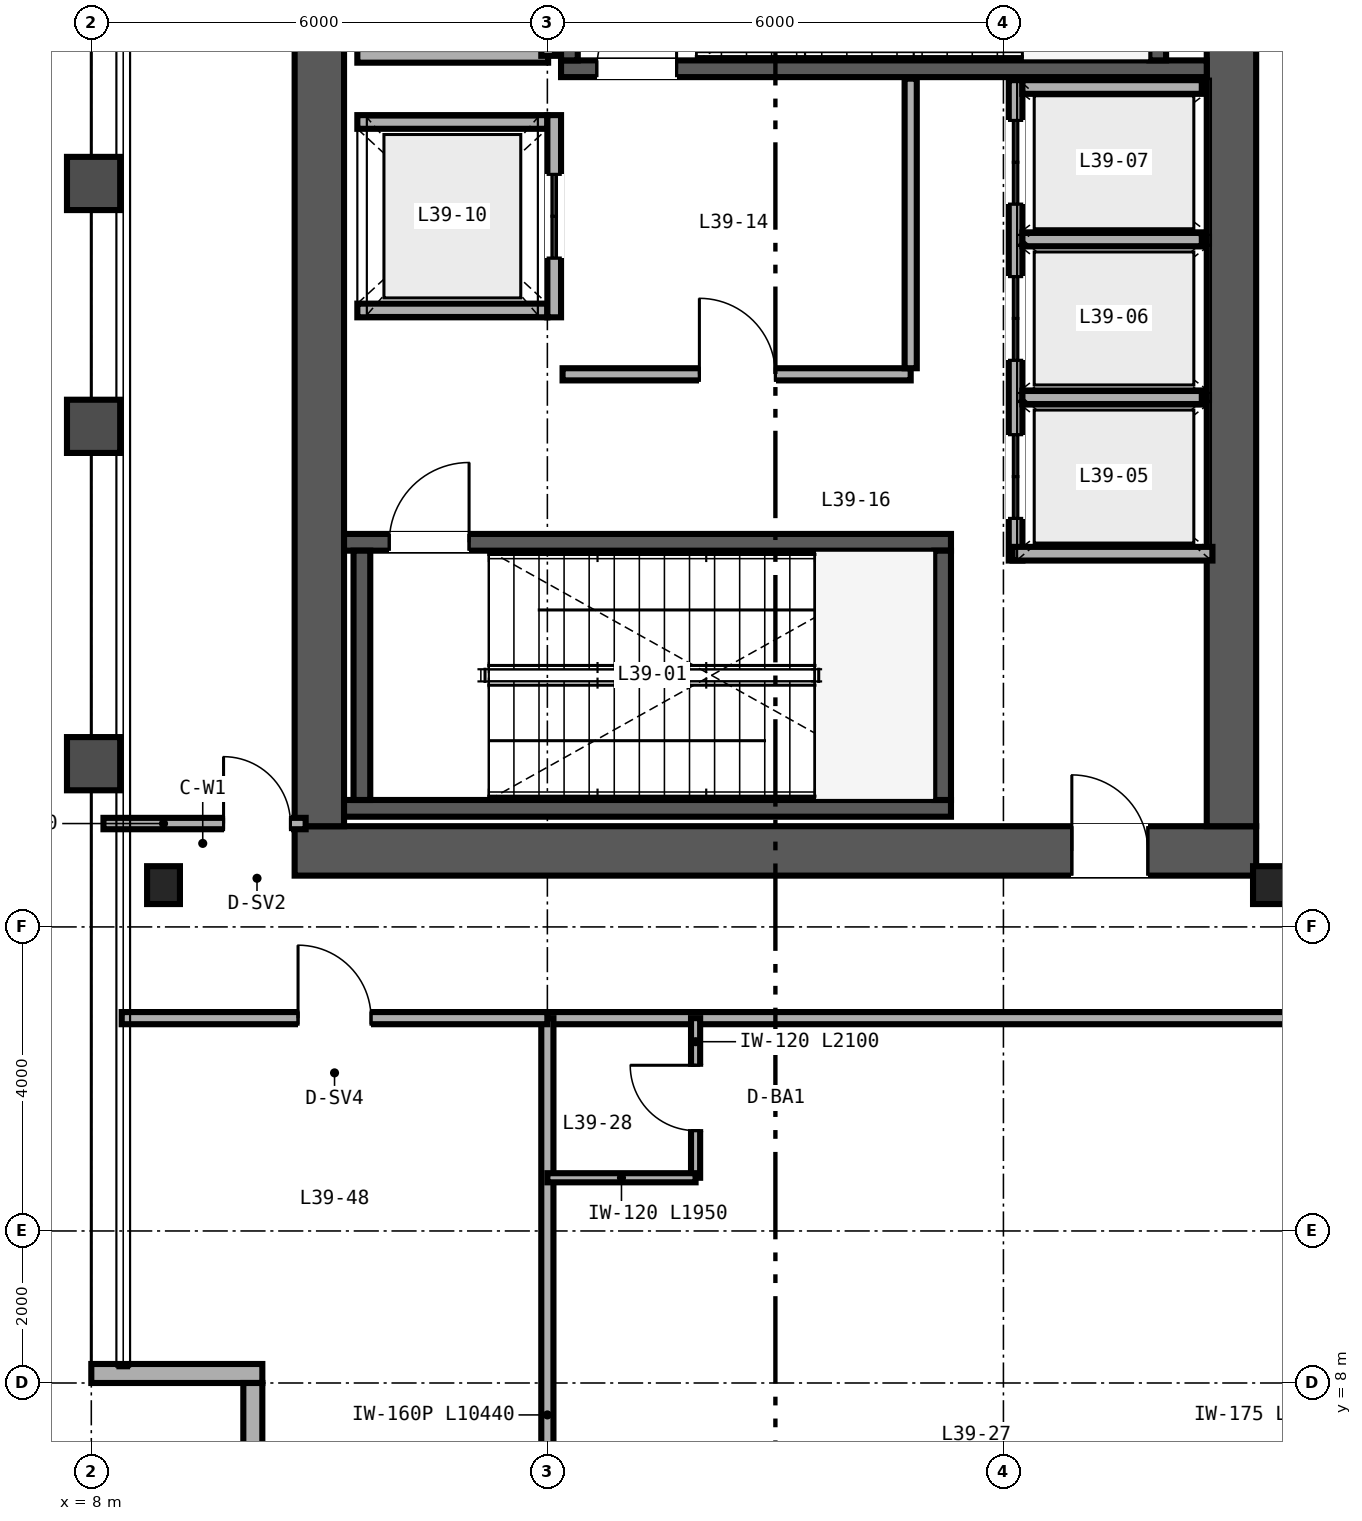
"""IFC4 building model, lengths in metres.
Left out: names, types, materials, properties, quantities, classifications, styles, units other than length and angle.
Written with IfcOpenShell. Run it as: python <this file> out.ifc"""

import sys

from ifc_helpers import new_model, si_unit, direction, frame, frame_2d, origin, origin_2d, place, context, subcontext, project, spatial, rectangle, i_section, extrude, source, transform, mapped, element, fill, save


model = new_model("IFC4")
c1 = context("Model", 3, precision=1e-05, world=origin(), true_north=direction((0.0, 1.0)))
c2 = subcontext(c1, "Body", "Model", "MODEL_VIEW")
j1 = project(units=[si_unit("LENGTHUNIT", "METRE"), si_unit("PLANEANGLEUNIT", "RADIAN")], contexts=[c1])
p1 = place(None, origin())
s1 = spatial("IfcSite", under=j1, at=p1, CompositionType="ELEMENT")
p2 = place(p1, origin())
s2 = spatial("IfcBuilding", under=s1, at=p2, CompositionType="ELEMENT")
p3 = place(p2, frame((0.0, 0.0, 158.4)))
s3 = spatial("IfcBuildingStorey", under=s2, at=p3, CompositionType="ELEMENT", Elevation=158.4)
p4 = place(p3, frame((10.675, 15.0, 0.0), z_axis=(0.0, 0.0, 1.0), x_axis=(1.0, 0.0, 0.0)))
e1 = element("IfcWall", 1, at=p4, inside=s3, PredefinedType="SHEAR", context=c2, shape_type="SweptSolid", body=[
    extrude(rectangle(XDim=12.65, YDim=0.65, at=frame_2d((6.325, 0.0))), origin(), (0.0, 0.0, 1.0), 4.57),
])
p5 = place(p4, frame((10.225, 0.0, 0.0)))
e2 = element("IfcOpeningElement", 2, at=p5, cuts=e1, PredefinedType="OPENING", context=c2, shape_type="SweptSolid", body=[
    extrude(rectangle(XDim=1.0, YDim=2.15, at=frame_2d((0.5, 1.075))), frame((0.0, 0.335, 0.0), z_axis=(0.0, -1.0, 0.0), x_axis=(1.0, 0.0, 0.0)), (0.0, 0.0, 1.0), 0.67),
])
for number, where, z_axis, x_axis in (
    (3, (11.0, 15.325, 0.0), (0.0, 0.0, 1.0), (0.0, 1.0, 0.0)),
    (4, (23.0, 15.325, 0.0), (0.0, 0.0, 1.0), (0.0, 1.0, 0.0)),
):
    element("IfcWall", number, at=place(p3, frame(where, z_axis=z_axis, x_axis=x_axis)), inside=s3, PredefinedType="SHEAR", context=c2, shape_type="SweptSolid", body=[
        extrude(rectangle(XDim=21.35, YDim=0.65, at=frame_2d((10.675, 0.0))), origin(), (0.0, 0.0, 1.0), 4.57),
    ])
p6 = place(p3, frame((11.325, 15.56, 0.0), z_axis=(0.0, 0.0, 1.0), x_axis=(1.0, 0.0, 0.0)))
e5 = element("IfcWall", 5, at=p6, inside=s3, PredefinedType="SHEAR", context=c2, shape_type="SweptSolid", body=[
    extrude(rectangle(XDim=7.985, YDim=0.22, at=frame_2d((3.993, 0.0))), origin(), (0.0, 0.0, 1.0), 4.6),
])
p7 = place(p3, frame((11.325, 19.06, 0.0), z_axis=(0.0, 0.0, 1.0), x_axis=(1.0, 0.0, 0.0)))
e6 = element("IfcWall", 6, at=p7, inside=s3, PredefinedType="SHEAR", context=c2, shape_type="SweptSolid", body=[
    extrude(rectangle(XDim=7.985, YDim=0.22, at=frame_2d((3.993, 0.0))), origin(), (0.0, 0.0, 1.0), 4.6),
])
p8 = place(p7, frame((0.595, 0.0, 0.0)))
e7 = element("IfcOpeningElement", 7, at=p8, cuts=e6, PredefinedType="OPENING", context=c2, shape_type="SweptSolid", body=[
    extrude(rectangle(XDim=1.05, YDim=2.15, at=frame_2d((0.525, 1.075))), frame((0.0, 0.12, 0.0), z_axis=(0.0, -1.0, 0.0), x_axis=(1.0, 0.0, 0.0)), (0.0, 0.0, 1.0), 0.24),
])
for number, where, z_axis, x_axis in (
    (8, (11.56, 15.67, 0.0), (0.0, 0.0, 1.0), (0.0, 1.0, 0.0)),
    (9, (19.2, 15.67, 0.0), (0.0, 0.0, 1.0), (0.0, 1.0, 0.0)),
):
    element("IfcWall", number, at=place(p3, frame(where, z_axis=z_axis, x_axis=x_axis)), inside=s3, PredefinedType="SHEAR", context=c2, shape_type="SweptSolid", body=[
        extrude(rectangle(XDim=3.28, YDim=0.22, at=frame_2d((1.64, 0.0))), origin(), (0.0, 0.0, 1.0), 4.6),
    ])
p9 = place(p3, frame((14.18, 25.29, 0.0), z_axis=(0.0, 0.0, 1.0), x_axis=(1.0, 0.0, 0.0)))
e10 = element("IfcWall", 10, at=p9, inside=s3, PredefinedType="SHEAR", context=c2, shape_type="SweptSolid", body=[
    extrude(rectangle(XDim=8.495, YDim=0.22, at=frame_2d((4.248, 0.0))), origin(), (0.0, 0.0, 1.0), 4.6),
])
p10 = place(p9, frame((0.47, 0.0, 0.0)))
e11 = element("IfcOpeningElement", 11, at=p10, cuts=e10, PredefinedType="OPENING", context=c2, shape_type="SweptSolid", body=[
    extrude(rectangle(XDim=1.05, YDim=2.15, at=frame_2d((0.525, 1.075))), frame((0.0, 0.12, 0.0), z_axis=(0.0, -1.0, 0.0), x_axis=(1.0, 0.0, 0.0)), (0.0, 0.0, 1.0), 0.24),
])
for number, where, z_axis, x_axis in (
    (12, (14.29, 25.4, 0.0), (0.0, 0.0, 1.0), (0.0, 1.0, 0.0)),
    (13, (22.03, 25.4, 0.0), (0.0, 0.0, 1.0), (0.0, 1.0, 0.0)),
):
    element("IfcWall", number, at=place(p3, frame(where, z_axis=z_axis, x_axis=x_axis)), inside=s3, PredefinedType="SHEAR", context=c2, shape_type="SweptSolid", body=[
        extrude(rectangle(XDim=3.28, YDim=0.22, at=frame_2d((1.64, 0.0))), origin(), (0.0, 0.0, 1.0), 4.6),
    ])
m1 = source(origin(), c2, "Body", "SweptSolid", [
    extrude(i_section(OverallWidth=0.432, OverallDepth=0.498, WebThickness=0.056, FlangeThickness=0.089, FilletRadius=0.025, at=origin_2d()), origin(), (0.0, 0.0, 1.0), 4.57),
])
for number, where, z_axis, x_axis in (
    (14, (8.95, 14.55, 0.0), (0.0, 0.0, 1.0), (1.0, 0.0, 0.0)),
    (15, (23.5, 14.55, 0.0), (0.0, 0.0, 1.0), (1.0, 0.0, 0.0)),
):
    element("IfcColumn", number, at=place(p3, frame(where, z_axis=z_axis, x_axis=x_axis)), inside=s3, PredefinedType="COLUMN", context=c2, shape_type="MappedRepresentation", body=[
        mapped(m1, transform((0.0, 0.0, 0.0), scale=1.0)),
    ])
p11 = place(p3, frame((8.0, 8.125, 0.0), z_axis=(0.0, 0.0, 1.0), x_axis=(1.0, 0.0, 0.0)))
e16 = element("IfcWall", 16, at=p11, inside=s3, PredefinedType="SOLIDWALL", context=c2, shape_type="SweptSolid", body=[
    extrude(rectangle(XDim=2.25, YDim=0.25, at=frame_2d((1.125, 0.0))), origin(), (0.0, 0.0, 1.0), 4.57),
])
p12 = place(p3, frame((10.125, 8.0, 0.0), z_axis=(0.0, 0.0, 1.0), x_axis=(0.0, -1.0, 0.0)))
e17 = element("IfcWall", 17, at=p12, inside=s3, PredefinedType="SOLIDWALL", context=c2, shape_type="SweptSolid", body=[
    extrude(rectangle(XDim=2.0, YDim=0.25, at=frame_2d((1.0, 0.0))), origin(), (0.0, 0.0, 1.0), 4.57),
])
p13 = place(p3, frame((20.16, 18.82, 0.0), z_axis=(0.0, 0.0, 1.0), x_axis=(0.0, 1.0, 0.0)))
e18 = element("IfcWall", 18, at=p13, inside=s3, PredefinedType="SOLIDWALL", context=c2, shape_type="SweptSolid", body=[
    extrude(rectangle(XDim=6.32, YDim=0.18, at=frame_2d((3.16, 0.0))), origin(), (0.0, 0.0, 1.0), 3.47),
])
p14 = place(p13, frame((0.555, 0.0, 0.0)))
e19 = element("IfcOpeningElement", 19, at=p14, cuts=e18, PredefinedType="OPENING", context=c2, shape_type="SweptSolid", body=[
    extrude(rectangle(XDim=1.1, YDim=2.2, at=frame_2d((0.55, 1.1))), frame((0.0, 0.1, 0.0), z_axis=(0.0, -1.0, 0.0), x_axis=(1.0, 0.0, 0.0)), (0.0, 0.0, 1.0), 0.2),
])
p15 = place(p13, frame((2.635, 0.0, 0.0)))
e20 = element("IfcOpeningElement", 20, at=p15, cuts=e18, PredefinedType="OPENING", context=c2, shape_type="SweptSolid", body=[
    extrude(rectangle(XDim=1.1, YDim=2.2, at=frame_2d((0.55, 1.1))), frame((0.0, 0.1, 0.0), z_axis=(0.0, -1.0, 0.0), x_axis=(1.0, 0.0, 0.0)), (0.0, 0.0, 1.0), 0.2),
])
p16 = place(p13, frame((4.69, 0.0, 0.0)))
e21 = element("IfcOpeningElement", 21, at=p16, cuts=e18, PredefinedType="OPENING", context=c2, shape_type="SweptSolid", body=[
    extrude(rectangle(XDim=1.1, YDim=2.2, at=frame_2d((0.55, 1.1))), frame((0.0, 0.1, 0.0), z_axis=(0.0, -1.0, 0.0), x_axis=(1.0, 0.0, 0.0)), (0.0, 0.0, 1.0), 0.2),
])
p17 = place(p3, frame((20.12, 18.91, 0.0), z_axis=(0.0, 0.0, 1.0), x_axis=(1.0, 0.0, 0.0)))
e22 = element("IfcWall", 22, at=p17, inside=s3, PredefinedType="SOLIDWALL", context=c2, shape_type="SweptSolid", body=[
    extrude(rectangle(XDim=2.63, YDim=0.18, at=frame_2d((1.315, 0.0))), origin(), (0.0, 0.0, 1.0), 4.57),
])
p18 = place(p3, frame((20.25, 25.05, 0.0), z_axis=(0.0, 0.0, 1.0), x_axis=(1.0, 0.0, 0.0)))
e23 = element("IfcWall", 23, at=p18, inside=s3, PredefinedType="SOLIDWALL", context=c2, shape_type="SweptSolid", body=[
    extrude(rectangle(XDim=2.36, YDim=0.18, at=frame_2d((1.18, 0.0))), origin(), (0.0, 0.0, 1.0), 4.57),
])
p19 = place(p3, frame((20.25, 20.965, 0.0), z_axis=(0.0, 0.0, 1.0), x_axis=(1.0, 0.0, 0.0)))
e24 = element("IfcWall", 24, at=p19, inside=s3, PredefinedType="SOLIDWALL", context=c2, shape_type="SweptSolid", body=[
    extrude(rectangle(XDim=2.36, YDim=0.18, at=frame_2d((1.18, 0.0))), origin(), (0.0, 0.0, 1.0), 3.47),
])
p20 = place(p3, frame((20.25, 23.045, 0.0), z_axis=(0.0, 0.0, 1.0), x_axis=(1.0, 0.0, 0.0)))
e25 = element("IfcWall", 25, at=p20, inside=s3, PredefinedType="SOLIDWALL", context=c2, shape_type="SweptSolid", body=[
    extrude(rectangle(XDim=2.36, YDim=0.18, at=frame_2d((1.18, 0.0))), origin(), (0.0, 0.0, 1.0), 4.57),
])
for number, where, z_axis, x_axis in (
    (26, (11.5, 22.11, 0.0), (0.0, 0.0, 1.0), (1.0, 0.0, 0.0)),
    (27, (11.5, 24.59, 0.0), (0.0, 0.0, 1.0), (1.0, 0.0, 0.0)),
):
    element("IfcWall", number, at=place(p3, frame(where, z_axis=z_axis, x_axis=x_axis)), inside=s3, PredefinedType="SOLIDWALL", context=c2, shape_type="SweptSolid", body=[
        extrude(rectangle(XDim=2.5, YDim=0.18, at=frame_2d((1.25, 0.0))), origin(), (0.0, 0.0, 1.0), 4.57),
    ])
p21 = place(p3, frame((14.09, 22.02, 0.0), z_axis=(0.0, 0.0, 1.0), x_axis=(0.0, 1.0, 0.0)))
e28 = element("IfcWall", 28, at=p21, inside=s3, PredefinedType="SOLIDWALL", context=c2, shape_type="SweptSolid", body=[
    extrude(rectangle(XDim=2.66, YDim=0.18, at=frame_2d((1.33, 0.0))), origin(), (0.0, 0.0, 1.0), 4.57),
])
p22 = place(p21, frame((0.78, 0.0, 0.0)))
e29 = element("IfcOpeningElement", 29, at=p22, cuts=e28, PredefinedType="OPENING", context=c2, shape_type="SweptSolid", body=[
    extrude(rectangle(XDim=1.1, YDim=2.2, at=frame_2d((0.55, 1.1))), frame((0.0, 0.1, 0.0), z_axis=(0.0, -1.0, 0.0), x_axis=(1.0, 0.0, 0.0)), (0.0, 0.0, 1.0), 0.2),
])
p23 = place(p3, frame((11.5, 25.46, 0.0), z_axis=(0.0, 0.0, 1.0), x_axis=(1.0, 0.0, 0.0)))
e30 = element("IfcWall", 30, at=p23, inside=s3, PredefinedType="SOLIDWALL", context=c2, shape_type="SweptSolid", body=[
    extrude(rectangle(XDim=2.51, YDim=0.18, at=frame_2d((1.255, 0.0))), origin(), (0.0, 0.0, 1.0), 4.57),
])
p24 = place(p3, frame((14.01, 25.46, 0.0), z_axis=(0.0, 0.0, 1.0), x_axis=(0.0, 1.0, 0.0)))
e31 = element("IfcWall", 31, at=p24, inside=s3, PredefinedType="SOLIDWALL", context=c2, shape_type="SweptSolid", body=[
    extrude(rectangle(XDim=3.08, YDim=0.18, at=frame_2d((1.54, 0.0))), origin(), (0.0, 0.0, 1.0), 4.57),
])
p25 = place(p3, frame((14.2, 21.27, 0.0), z_axis=(0.0, 0.0, 1.0), x_axis=(1.0, 0.0, 0.0)))
e32 = element("IfcWall", 32, at=p25, inside=s3, PredefinedType="PARTITIONING", context=c2, shape_type="SweptSolid", body=[
    extrude(rectangle(XDim=4.58, YDim=0.16, at=frame_2d((2.29, 0.0))), origin(), (0.0, 0.0, 1.0), 4.57),
])
p26 = place(p25, frame((1.8, 0.0, 0.0)))
e33 = element("IfcOpeningElement", 33, at=p26, cuts=e32, PredefinedType="OPENING", context=c2, shape_type="SweptSolid", body=[
    extrude(rectangle(XDim=1.0, YDim=2.15, at=frame_2d((0.5, 1.075))), frame((0.0, 0.09, 0.0), z_axis=(0.0, -1.0, 0.0), x_axis=(1.0, 0.0, 0.0)), (0.0, 0.0, 1.0), 0.18),
])
p27 = place(p3, frame((18.78, 21.35, 0.0), z_axis=(0.0, 0.0, 1.0), x_axis=(0.0, 1.0, 0.0)))
e34 = element("IfcWall", 34, at=p27, inside=s3, PredefinedType="PARTITIONING", context=c2, shape_type="SweptSolid", body=[
    extrude(rectangle(XDim=3.81, YDim=0.16, at=frame_2d((1.905, 0.0))), origin(), (0.0, 0.0, 1.0), 4.57),
])
p28 = place(p3, frame((14.0, 12.8, 0.0), z_axis=(0.0, 0.0, 1.0), x_axis=(1.0, 0.0, 0.0)))
e35 = element("IfcWall", 35, at=p28, inside=s3, PredefinedType="PARTITIONING", context=c2, shape_type="SweptSolid", body=[
    extrude(rectangle(XDim=36.0, YDim=0.16, at=frame_2d((18.0, 0.0))), origin(), (0.0, 0.0, 1.0), 4.113),
])
p29 = place(p28, frame((9.7, 0.0, 0.0)))
e36 = element("IfcOpeningElement", 36, at=p29, cuts=e35, PredefinedType="OPENING", context=c2, shape_type="SweptSolid", body=[
    extrude(rectangle(XDim=0.98, YDim=2.2, at=frame_2d((0.49, 1.1))), frame((0.0, 0.09, 0.0), z_axis=(0.0, -1.0, 0.0), x_axis=(1.0, 0.0, 0.0)), (0.0, 0.0, 1.0), 0.18),
])
p30 = place(p28, frame((16.02, 0.0, 0.0)))
e37 = element("IfcOpeningElement", 37, at=p30, cuts=e35, PredefinedType="OPENING", context=c2, shape_type="SweptSolid", body=[
    extrude(rectangle(XDim=0.96, YDim=2.15, at=frame_2d((0.48, 1.075))), frame((0.0, 0.09, 0.0), z_axis=(0.0, -1.0, 0.0), x_axis=(1.0, 0.0, 0.0)), (0.0, 0.0, 1.0), 0.18),
])
p31 = place(p28, frame((28.7, 0.0, 0.0)))
e38 = element("IfcOpeningElement", 38, at=p31, cuts=e35, PredefinedType="OPENING", context=c2, shape_type="SweptSolid", body=[
    extrude(rectangle(XDim=0.98, YDim=2.2, at=frame_2d((0.49, 1.1))), frame((0.0, 0.09, 0.0), z_axis=(0.0, -1.0, 0.0), x_axis=(1.0, 0.0, 0.0)), (0.0, 0.0, 1.0), 0.18),
])
p32 = place(p28, frame((32.52, 0.0, 0.0)))
e39 = element("IfcOpeningElement", 39, at=p32, cuts=e35, PredefinedType="OPENING", context=c2, shape_type="SweptSolid", body=[
    extrude(rectangle(XDim=0.96, YDim=2.15, at=frame_2d((0.48, 1.075))), frame((0.0, 0.09, 0.0), z_axis=(0.0, -1.0, 0.0), x_axis=(1.0, 0.0, 0.0)), (0.0, 0.0, 1.0), 0.18),
])
p33 = place(p3, frame((14.0, 2.36, 0.0), z_axis=(0.0, 0.0, 1.0), x_axis=(0.0, 1.0, 0.0)))
e40 = element("IfcWall", 40, at=p33, inside=s3, PredefinedType="PARTITIONING", context=c2, shape_type="SweptSolid", body=[
    extrude(rectangle(XDim=10.44, YDim=0.16, at=frame_2d((5.22, 0.0))), origin(), (0.0, 0.0, 1.0), 3.877),
])
p34 = place(p3, frame((15.95, 10.7, 0.0), z_axis=(0.0, 0.0, 1.0), x_axis=(0.0, 1.0, 0.0)))
e41 = element("IfcWall", 41, at=p34, inside=s3, PredefinedType="PARTITIONING", context=c2, shape_type="SweptSolid", body=[
    extrude(rectangle(XDim=2.1, YDim=0.12, at=frame_2d((1.05, 0.0))), origin(), (0.0, 0.0, 1.0), 4.57),
])
p35 = place(p34, frame((0.62, 0.0, 0.0)))
e42 = element("IfcOpeningElement", 42, at=p35, cuts=e41, PredefinedType="OPENING", context=c2, shape_type="SweptSolid", body=[
    extrude(rectangle(XDim=0.86, YDim=2.1, at=frame_2d((0.43, 1.05))), frame((0.0, 0.07, 0.0), z_axis=(0.0, -1.0, 0.0), x_axis=(1.0, 0.0, 0.0)), (0.0, 0.0, 1.0), 0.14),
])
p36 = place(p3, frame((14.0, 10.7, 0.0), z_axis=(0.0, 0.0, 1.0), x_axis=(1.0, 0.0, 0.0)))
e43 = element("IfcWall", 43, at=p36, inside=s3, PredefinedType="PARTITIONING", context=c2, shape_type="SweptSolid", body=[
    extrude(rectangle(XDim=1.95, YDim=0.12, at=frame_2d((0.975, 0.0))), origin(), (0.0, 0.0, 1.0), 4.57),
])
p37 = place(p3, frame((8.16, 15.36, 0.0), z_axis=(0.0, 0.0, 1.0), x_axis=(1.0, 0.0, 0.0)))
e44 = element("IfcWall", 44, at=p37, inside=s3, PredefinedType="PARTITIONING", context=c2, shape_type="SweptSolid", body=[
    extrude(rectangle(XDim=2.66, YDim=0.15, at=frame_2d((1.33, 0.0))), origin(), (0.0, 0.0, 1.0), 3.791),
])
p38 = place(p37, frame((1.58, 0.0, 0.0)))
e45 = element("IfcOpeningElement", 45, at=p38, cuts=e44, PredefinedType="OPENING", context=c2, shape_type="SweptSolid", body=[
    extrude(rectangle(XDim=0.88, YDim=2.15, at=frame_2d((0.44, 1.075))), frame((0.0, 0.085, 0.0), z_axis=(0.0, -1.0, 0.0), x_axis=(1.0, 0.0, 0.0)), (0.0, 0.0, 1.0), 0.17),
])
p39 = place(p3, frame((8.4, 12.8, 0.0), z_axis=(0.0, 0.0, 1.0), x_axis=(1.0, 0.0, 0.0)))
e46 = element("IfcWall", 46, at=p39, inside=s3, PredefinedType="PARTITIONING", context=c2, shape_type="SweptSolid", body=[
    extrude(rectangle(XDim=5.6, YDim=0.16, at=frame_2d((2.8, 0.0))), origin(), (0.0, 0.0, 1.0), 4.57),
])
p40 = place(p39, frame((2.32, 0.0, 0.0)))
e47 = element("IfcOpeningElement", 47, at=p40, cuts=e46, PredefinedType="OPENING", context=c2, shape_type="SweptSolid", body=[
    extrude(rectangle(XDim=0.96, YDim=2.15, at=frame_2d((0.48, 1.075))), frame((0.0, 0.09, 0.0), z_axis=(0.0, -1.0, 0.0), x_axis=(1.0, 0.0, 0.0)), (0.0, 0.0, 1.0), 0.18),
])
m2 = source(origin(), c2, "Body", "SweptSolid", [
    extrude(rectangle(XDim=1.05, YDim=2.15, at=frame_2d((0.525, 1.075))), frame((0.0, 0.025, 0.0), z_axis=(0.0, -1.0, 0.0), x_axis=(1.0, 0.0, 0.0)), (0.0, 0.0, 1.0), 0.05),
])
p41 = place(p8, origin())
e48 = element("IfcDoor", 48, at=p41, inside=s3, OperationType="SINGLE_SWING_RIGHT", PredefinedType="DOOR", context=c2, shape_type="MappedRepresentation", body=[
    mapped(m2, transform((0.0, 0.0, 0.0), scale=1.0)),
])
fill(e7, e48)
p42 = place(p10, origin())
e49 = element("IfcDoor", 49, at=p42, inside=s3, OperationType="SINGLE_SWING_RIGHT", PredefinedType="DOOR", context=c2, shape_type="MappedRepresentation", body=[
    mapped(m2, transform((0.0, 0.0, 0.0), scale=1.0)),
])
fill(e11, e49)
m3 = source(origin(), c2, "Body", "SweptSolid", [
    extrude(rectangle(XDim=1.1, YDim=2.2, at=frame_2d((0.55, 1.1))), frame((0.0, 0.025, 0.0), z_axis=(0.0, -1.0, 0.0), x_axis=(1.0, 0.0, 0.0)), (0.0, 0.0, 1.0), 0.05),
])
p43 = place(p14, origin())
e50 = element("IfcDoor", 50, at=p43, inside=s3, OperationType="DOUBLE_DOOR_SLIDING", PredefinedType="DOOR", context=c2, shape_type="MappedRepresentation", body=[
    mapped(m3, transform((0.0, 0.0, 0.0), scale=1.0)),
])
fill(e19, e50)
p44 = place(p15, origin())
e51 = element("IfcDoor", 51, at=p44, inside=s3, OperationType="DOUBLE_DOOR_SLIDING", PredefinedType="DOOR", context=c2, shape_type="MappedRepresentation", body=[
    mapped(m3, transform((0.0, 0.0, 0.0), scale=1.0)),
])
fill(e20, e51)
p45 = place(p16, origin())
e52 = element("IfcDoor", 52, at=p45, inside=s3, OperationType="DOUBLE_DOOR_SLIDING", PredefinedType="DOOR", context=c2, shape_type="MappedRepresentation", body=[
    mapped(m3, transform((0.0, 0.0, 0.0), scale=1.0)),
])
fill(e21, e52)
p46 = place(p22, origin())
e53 = element("IfcDoor", 53, at=p46, inside=s3, OperationType="DOUBLE_DOOR_SLIDING", PredefinedType="DOOR", context=c2, shape_type="MappedRepresentation", body=[
    mapped(m3, transform((0.0, 0.0, 0.0), scale=1.0)),
])
fill(e29, e53)
m4 = source(origin(), c2, "Body", "SweptSolid", [
    extrude(rectangle(XDim=1.0, YDim=2.15, at=frame_2d((0.5, 1.075))), frame((0.0, 0.025, 0.0), z_axis=(0.0, -1.0, 0.0), x_axis=(1.0, 0.0, 0.0)), (0.0, 0.0, 1.0), 0.05),
])
p47 = place(p26, origin())
e54 = element("IfcDoor", 54, at=p47, inside=s3, OperationType="SINGLE_SWING_LEFT", PredefinedType="DOOR", context=c2, shape_type="MappedRepresentation", body=[
    mapped(m4, transform((0.0, 0.0, 0.0), scale=1.0)),
])
fill(e33, e54)
p48 = place(p5, origin())
e55 = element("IfcDoor", 55, at=p48, inside=s3, OperationType="SINGLE_SWING_LEFT", PredefinedType="DOOR", context=c2, shape_type="MappedRepresentation", body=[
    mapped(m4, transform((0.0, 0.0, 0.0), scale=1.0)),
])
fill(e2, e55)
m5 = source(origin(), c2, "Body", "SweptSolid", [
    extrude(rectangle(XDim=0.86, YDim=2.1, at=frame_2d((0.43, 1.05))), frame((0.0, 0.025, 0.0), z_axis=(0.0, -1.0, 0.0), x_axis=(1.0, 0.0, 0.0)), (0.0, 0.0, 1.0), 0.05),
])
p49 = place(p35, origin())
e56 = element("IfcDoor", 56, at=p49, inside=s3, OperationType="SINGLE_SWING_RIGHT", PredefinedType="DOOR", context=c2, shape_type="MappedRepresentation", body=[
    mapped(m5, transform((0.0, 0.0, 0.0), scale=1.0)),
])
fill(e42, e56)
m6 = source(origin(), c2, "Body", "SweptSolid", [
    extrude(rectangle(XDim=0.88, YDim=2.15, at=frame_2d((0.44, 1.075))), frame((0.0, 0.025, 0.0), z_axis=(0.0, -1.0, 0.0), x_axis=(1.0, 0.0, 0.0)), (0.0, 0.0, 1.0), 0.05),
])
p50 = place(p38, origin())
e57 = element("IfcDoor", 57, at=p50, inside=s3, OperationType="SINGLE_SWING_LEFT", PredefinedType="DOOR", context=c2, shape_type="MappedRepresentation", body=[
    mapped(m6, transform((0.0, 0.0, 0.0), scale=1.0)),
])
fill(e45, e57)
m7 = source(origin(), c2, "Body", "SweptSolid", [
    extrude(rectangle(XDim=0.96, YDim=2.15, at=frame_2d((0.48, 1.075))), frame((0.0, 0.025, 0.0), z_axis=(0.0, -1.0, 0.0), x_axis=(1.0, 0.0, 0.0)), (0.0, 0.0, 1.0), 0.05),
])
p51 = place(p40, origin())
e58 = element("IfcDoor", 58, at=p51, inside=s3, OperationType="SINGLE_SWING_LEFT", PredefinedType="DOOR", context=c2, shape_type="MappedRepresentation", body=[
    mapped(m7, transform((0.0, 0.0, 0.0), scale=1.0)),
])
fill(e47, e58)
save(model, sys.argv[1])
